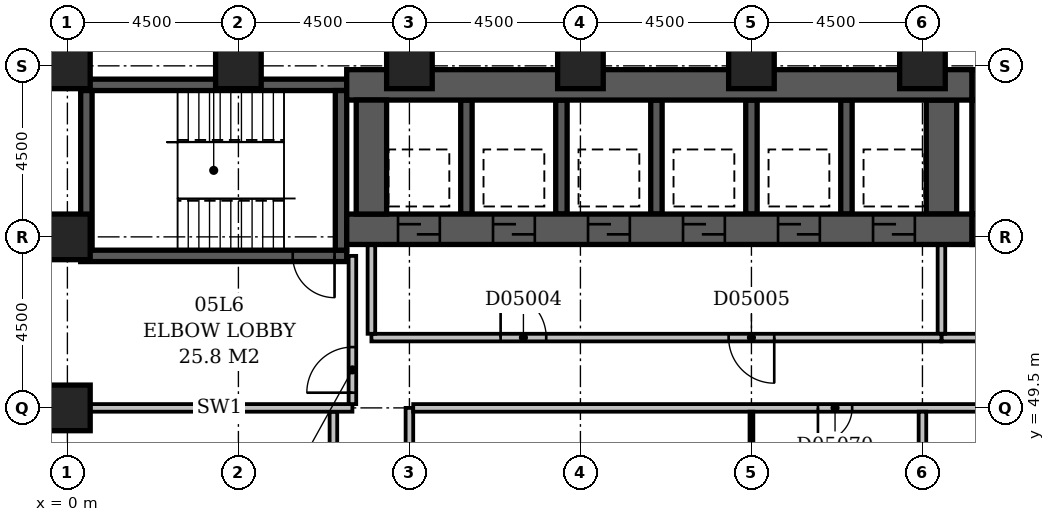
"""IFC4 building model, lengths in metres.
Left out: names, types, materials, properties, quantities, classifications, styles, units other than length and angle.
Written with IfcOpenShell. Run it as: python <this file> out.ifc"""

import sys

from ifc_helpers import new_model, si_unit, direction, frame, frame_2d, origin, origin_2d, place, context, subcontext, project, spatial, rectangle, extrude, element, fill, save


model = new_model("IFC4")
c1 = context("Model", 3, precision=1e-05, world=origin(), true_north=direction((0.0, 1.0)))
c2 = subcontext(c1, "Body", "Model", "MODEL_VIEW")
j1 = project(units=[si_unit("LENGTHUNIT", "METRE"), si_unit("PLANEANGLEUNIT", "RADIAN")], contexts=[c1])
p1 = place(None, origin())
s1 = spatial("IfcSite", under=j1, at=p1, CompositionType="ELEMENT")
p2 = place(p1, origin())
s2 = spatial("IfcBuilding", under=s1, at=p2, CompositionType="ELEMENT")
p3 = place(p2, frame((0.0, 0.0, 29.0)))
s3 = spatial("IfcBuildingStorey", under=s2, at=p3, CompositionType="ELEMENT", Elevation=29.0)
p4 = place(p3, frame((0.35, 53.5, -0.3), z_axis=(0.0, 0.0, 1.0), x_axis=(1.0, 0.0, 0.0)))
e1 = element("IfcWall", 1, at=p4, inside=s3, PredefinedType="SHEAR", context=c2, shape_type="SweptSolid", body=[
    extrude(rectangle(XDim=7.0, YDim=0.3, at=frame_2d((3.5, 0.0))), origin(), (0.0, 0.0, 1.0), 3.6),
])
p5 = place(p4, frame((5.58, 0.0, 0.3)))
e2 = element("IfcOpeningElement", 2, at=p5, cuts=e1, PredefinedType="OPENING", context=c2, shape_type="SweptSolid", body=[
    extrude(rectangle(XDim=1.1, YDim=2.1, at=frame_2d((0.55, 1.05))), frame((0.0, 0.162, 0.0), z_axis=(0.0, -1.0, 0.0), x_axis=(1.0, 0.0, 0.0)), (0.0, 0.0, 1.0), 0.324),
])
p6 = place(p3, frame((0.35, 58.0, -0.3), z_axis=(0.0, 0.0, 1.0), x_axis=(1.0, 0.0, 0.0)))
e3 = element("IfcWall", 3, at=p6, inside=s3, PredefinedType="SHEAR", context=c2, shape_type="SweptSolid", body=[
    extrude(rectangle(XDim=7.0, YDim=0.3, at=frame_2d((3.5, 0.0))), origin(), (0.0, 0.0, 1.0), 3.6),
])
for number, where, z_axis, x_axis in (
    (4, (0.5, 53.65, -0.3), (0.0, 0.0, 1.0), (0.0, 1.0, 0.0)),
    (5, (7.2, 53.65, -0.3), (0.0, 0.0, 1.0), (0.0, 1.0, 0.0)),
):
    element("IfcWall", number, at=place(p3, frame(where, z_axis=z_axis, x_axis=x_axis)), inside=s3, PredefinedType="SHEAR", context=c2, shape_type="SweptSolid", body=[
        extrude(rectangle(XDim=4.2, YDim=0.3, at=frame_2d((2.1, 0.0))), origin(), (0.0, 0.0, 1.0), 3.6),
    ])
p7 = place(p3, frame((7.35, 54.2, -0.3), z_axis=(0.0, 0.0, 1.0), x_axis=(1.0, 0.0, 0.0)))
e6 = element("IfcWall", 6, at=p7, inside=s3, PredefinedType="SHEAR", context=c2, shape_type="SweptSolid", body=[
    extrude(rectangle(XDim=16.45, YDim=0.8, at=frame_2d((8.225, 0.0))), origin(), (0.0, 0.0, 1.0), 3.6),
])
p8 = place(p7, frame((1.35, 0.0, 0.3)))
e7 = element("IfcOpeningElement", 7, at=p8, cuts=e6, PredefinedType="OPENING", context=c2, shape_type="SweptSolid", body=[
    extrude(rectangle(XDim=1.1, YDim=2.1, at=frame_2d((0.55, 1.05))), frame((0.0, 0.412, 0.0), z_axis=(0.0, -1.0, 0.0), x_axis=(1.0, 0.0, 0.0)), (0.0, 0.0, 1.0), 0.824),
])
p9 = place(p7, frame((3.85, 0.0, 0.3)))
e8 = element("IfcOpeningElement", 8, at=p9, cuts=e6, PredefinedType="OPENING", context=c2, shape_type="SweptSolid", body=[
    extrude(rectangle(XDim=1.1, YDim=2.1, at=frame_2d((0.55, 1.05))), frame((0.0, 0.412, 0.0), z_axis=(0.0, -1.0, 0.0), x_axis=(1.0, 0.0, 0.0)), (0.0, 0.0, 1.0), 0.824),
])
p10 = place(p7, frame((6.35, 0.0, 0.3)))
e9 = element("IfcOpeningElement", 9, at=p10, cuts=e6, PredefinedType="OPENING", context=c2, shape_type="SweptSolid", body=[
    extrude(rectangle(XDim=1.1, YDim=2.1, at=frame_2d((0.55, 1.05))), frame((0.0, 0.412, 0.0), z_axis=(0.0, -1.0, 0.0), x_axis=(1.0, 0.0, 0.0)), (0.0, 0.0, 1.0), 0.824),
])
p11 = place(p7, frame((8.85, 0.0, 0.3)))
e10 = element("IfcOpeningElement", 10, at=p11, cuts=e6, PredefinedType="OPENING", context=c2, shape_type="SweptSolid", body=[
    extrude(rectangle(XDim=1.1, YDim=2.1, at=frame_2d((0.55, 1.05))), frame((0.0, 0.412, 0.0), z_axis=(0.0, -1.0, 0.0), x_axis=(1.0, 0.0, 0.0)), (0.0, 0.0, 1.0), 0.824),
])
p12 = place(p7, frame((11.35, 0.0, 0.3)))
e11 = element("IfcOpeningElement", 11, at=p12, cuts=e6, PredefinedType="OPENING", context=c2, shape_type="SweptSolid", body=[
    extrude(rectangle(XDim=1.1, YDim=2.1, at=frame_2d((0.55, 1.05))), frame((0.0, 0.412, 0.0), z_axis=(0.0, -1.0, 0.0), x_axis=(1.0, 0.0, 0.0)), (0.0, 0.0, 1.0), 0.824),
])
p13 = place(p7, frame((13.85, 0.0, 0.3)))
e12 = element("IfcOpeningElement", 12, at=p13, cuts=e6, PredefinedType="OPENING", context=c2, shape_type="SweptSolid", body=[
    extrude(rectangle(XDim=1.1, YDim=2.1, at=frame_2d((0.55, 1.05))), frame((0.0, 0.412, 0.0), z_axis=(0.0, -1.0, 0.0), x_axis=(1.0, 0.0, 0.0)), (0.0, 0.0, 1.0), 0.824),
])
p14 = place(p3, frame((7.35, 58.0, -0.3), z_axis=(0.0, 0.0, 1.0), x_axis=(1.0, 0.0, 0.0)))
e13 = element("IfcWall", 13, at=p14, inside=s3, PredefinedType="SHEAR", context=c2, shape_type="SweptSolid", body=[
    extrude(rectangle(XDim=16.45, YDim=0.8, at=frame_2d((8.225, 0.0))), origin(), (0.0, 0.0, 1.0), 3.6),
])
p15 = place(p3, frame((8.0, 54.6, -0.3), z_axis=(0.0, 0.0, 1.0), x_axis=(0.0, 1.0, 0.0)))
e14 = element("IfcWall", 14, at=p15, inside=s3, PredefinedType="SHEAR", context=c2, shape_type="SweptSolid", body=[
    extrude(rectangle(XDim=3.0, YDim=0.8, at=frame_2d((1.5, 0.0))), origin(), (0.0, 0.0, 1.0), 3.6),
])
for number, where, z_axis, x_axis in (
    (15, (10.5, 54.6, -0.3), (0.0, 0.0, 1.0), (0.0, 1.0, 0.0)),
    (16, (13.0, 54.6, -0.3), (0.0, 0.0, 1.0), (0.0, 1.0, 0.0)),
    (17, (15.5, 54.6, -0.3), (0.0, 0.0, 1.0), (0.0, 1.0, 0.0)),
    (18, (18.0, 54.6, -0.3), (0.0, 0.0, 1.0), (0.0, 1.0, 0.0)),
    (19, (20.5, 54.6, -0.3), (0.0, 0.0, 1.0), (0.0, 1.0, 0.0)),
):
    element("IfcWall", number, at=place(p3, frame(where, z_axis=z_axis, x_axis=x_axis)), inside=s3, PredefinedType="SHEAR", context=c2, shape_type="SweptSolid", body=[
        extrude(rectangle(XDim=3.0, YDim=0.3, at=frame_2d((1.5, 0.0))), origin(), (0.0, 0.0, 1.0), 3.6),
    ])
p16 = place(p3, frame((23.0, 54.6, -0.3), z_axis=(0.0, 0.0, 1.0), x_axis=(0.0, 1.0, 0.0)))
e20 = element("IfcWall", 20, at=p16, inside=s3, PredefinedType="SHEAR", context=c2, shape_type="SweptSolid", body=[
    extrude(rectangle(XDim=3.0, YDim=0.8, at=frame_2d((1.5, 0.0))), origin(), (0.0, 0.0, 1.0), 3.6),
])
p17 = place(p3, frame((23.8, 54.2, -0.3), z_axis=(0.0, 0.0, 1.0), x_axis=(1.0, 0.0, 0.0)))
e21 = element("IfcWall", 21, at=p17, inside=s3, PredefinedType="SHEAR", context=c2, shape_type="SweptSolid", body=[
    extrude(rectangle(XDim=3.3, YDim=0.8, at=frame_2d((1.65, 0.0))), origin(), (0.0, 0.0, 1.0), 3.6),
])
p18 = place(p17, frame((1.1, 0.0, 0.3)))
e22 = element("IfcOpeningElement", 22, at=p18, cuts=e21, PredefinedType="OPENING", context=c2, shape_type="SweptSolid", body=[
    extrude(rectangle(XDim=1.1, YDim=2.1, at=frame_2d((0.55, 1.05))), frame((0.0, 0.412, 0.0), z_axis=(0.0, -1.0, 0.0), x_axis=(1.0, 0.0, 0.0)), (0.0, 0.0, 1.0), 0.824),
])
p19 = place(p3, frame((23.8, 58.0, -0.3), z_axis=(0.0, 0.0, 1.0), x_axis=(1.0, 0.0, 0.0)))
e23 = element("IfcWall", 23, at=p19, inside=s3, PredefinedType="SHEAR", context=c2, shape_type="SweptSolid", body=[
    extrude(rectangle(XDim=3.3, YDim=0.8, at=frame_2d((1.65, 0.0))), origin(), (0.0, 0.0, 1.0), 3.6),
])
p20 = place(p3, frame((24.2, 54.6, -0.3), z_axis=(0.0, 0.0, 1.0), x_axis=(0.0, 1.0, 0.0)))
e24 = element("IfcWall", 24, at=p20, inside=s3, PredefinedType="SHEAR", context=c2, shape_type="SweptSolid", body=[
    extrude(rectangle(XDim=3.0, YDim=0.8, at=frame_2d((1.5, 0.0))), origin(), (0.0, 0.0, 1.0), 3.6),
])
for number, where, z_axis, x_axis in (
    (25, (0.0, 49.5, -0.3), (0.0, 0.0, 1.0), (1.0, 0.0, 0.0)),
    (26, (0.0, 54.0, -0.3), (0.0, 0.0, 1.0), (1.0, 0.0, 0.0)),
    (27, (0.0, 58.5, -0.3), (0.0, 0.0, 1.0), (1.0, 0.0, 0.0)),
    (28, (4.5, 58.5, -0.3), (0.0, 0.0, 1.0), (1.0, 0.0, 0.0)),
    (29, (9.0, 58.5, -0.3), (0.0, 0.0, 1.0), (1.0, 0.0, 0.0)),
    (30, (13.5, 58.5, -0.3), (0.0, 0.0, 1.0), (1.0, 0.0, 0.0)),
    (31, (18.0, 58.5, -0.3), (0.0, 0.0, 1.0), (1.0, 0.0, 0.0)),
    (32, (22.5, 58.5, -0.3), (0.0, 0.0, 1.0), (1.0, 0.0, 0.0)),
):
    element("IfcColumn", number, at=place(p3, frame(where, z_axis=z_axis, x_axis=x_axis)), inside=s3, PredefinedType="COLUMN", context=c2, shape_type="SweptSolid", body=[
        extrude(rectangle(XDim=1.2, YDim=1.2, at=origin_2d()), origin(), (0.0, 0.0, 1.0), 3.6),
    ])
p21 = place(p3, frame((8.0, 51.35, 0.0), z_axis=(0.0, 0.0, 1.0), x_axis=(1.0, 0.0, 0.0)))
e33 = element("IfcWall", 33, at=p21, inside=s3, PredefinedType="PARTITIONING", context=c2, shape_type="SweptSolid", body=[
    extrude(rectangle(XDim=15.0, YDim=0.2, at=frame_2d((7.5, 0.0))), origin(), (0.0, 0.0, 1.0), 3.3),
])
p22 = place(p21, frame((3.4, 0.0, 0.0)))
e34 = element("IfcOpeningElement", 34, at=p22, cuts=e33, PredefinedType="OPENING", context=c2, shape_type="SweptSolid", body=[
    extrude(rectangle(XDim=1.2, YDim=2.1, at=frame_2d((0.6, 1.05))), frame((0.0, 0.112, 0.0), z_axis=(0.0, -1.0, 0.0), x_axis=(1.0, 0.0, 0.0)), (0.0, 0.0, 1.0), 0.224),
])
p23 = place(p21, frame((9.4, 0.0, 0.0)))
e35 = element("IfcOpeningElement", 35, at=p23, cuts=e33, PredefinedType="OPENING", context=c2, shape_type="SweptSolid", body=[
    extrude(rectangle(XDim=1.2, YDim=2.1, at=frame_2d((0.6, 1.05))), frame((0.0, 0.112, 0.0), z_axis=(0.0, -1.0, 0.0), x_axis=(1.0, 0.0, 0.0)), (0.0, 0.0, 1.0), 0.224),
])
for number, where, z_axis, x_axis in (
    (36, (23.0, 51.45, 0.0), (0.0, 0.0, 1.0), (0.0, 1.0, 0.0)),
    (37, (8.0, 51.45, 0.0), (0.0, 0.0, 1.0), (0.0, 1.0, 0.0)),
):
    element("IfcWall", number, at=place(p3, frame(where, z_axis=z_axis, x_axis=x_axis)), inside=s3, PredefinedType="PARTITIONING", context=c2, shape_type="SweptSolid", body=[
        extrude(rectangle(XDim=2.33, YDim=0.2, at=frame_2d((1.165, 0.0))), origin(), (0.0, 0.0, 1.0), 3.3),
    ])
p24 = place(p3, frame((23.0, 51.35, 0.0), z_axis=(0.0, 0.0, 1.0), x_axis=(1.0, 0.0, 0.0)))
e38 = element("IfcWall", 38, at=p24, inside=s3, PredefinedType="PARTITIONING", context=c2, shape_type="SweptSolid", body=[
    extrude(rectangle(XDim=4.8, YDim=0.2, at=frame_2d((2.4, 0.0))), origin(), (0.0, 0.0, 1.0), 3.3),
])
p25 = place(p24, frame((1.65, 0.0, 0.0)))
e39 = element("IfcOpeningElement", 39, at=p25, cuts=e38, PredefinedType="OPENING", context=c2, shape_type="SweptSolid", body=[
    extrude(rectangle(XDim=1.2, YDim=2.1, at=frame_2d((0.6, 1.05))), frame((0.0, 0.112, 0.0), z_axis=(0.0, -1.0, 0.0), x_axis=(1.0, 0.0, 0.0)), (0.0, 0.0, 1.0), 0.224),
])
p26 = place(p3, frame((0.5, 49.5, 0.0), z_axis=(0.0, 0.0, 1.0), x_axis=(1.0, 0.0, 0.0)))
e40 = element("IfcWall", 40, at=p26, inside=s3, PredefinedType="PARTITIONING", context=c2, shape_type="SweptSolid", body=[
    extrude(rectangle(XDim=7.0, YDim=0.2, at=frame_2d((3.5, 0.0))), origin(), (0.0, 0.0, 1.0), 3.3),
])
p27 = place(p3, frame((7.5, 49.6, 0.0), z_axis=(0.0, 0.0, 1.0), x_axis=(0.0, 1.0, 0.0)))
e41 = element("IfcWall", 41, at=p27, inside=s3, PredefinedType="PARTITIONING", context=c2, shape_type="SweptSolid", body=[
    extrude(rectangle(XDim=3.9, YDim=0.2, at=frame_2d((1.95, 0.0))), origin(), (0.0, 0.0, 1.0), 3.3),
])
p28 = place(p27, frame((0.3, 0.0, 0.0)))
e42 = element("IfcOpeningElement", 42, at=p28, cuts=e41, PredefinedType="OPENING", context=c2, shape_type="SweptSolid", body=[
    extrude(rectangle(XDim=1.2, YDim=2.1, at=frame_2d((0.6, 1.05))), frame((0.0, 0.112, 0.0), z_axis=(0.0, -1.0, 0.0), x_axis=(1.0, 0.0, 0.0)), (0.0, 0.0, 1.0), 0.224),
])
p29 = place(p3, frame((9.0, 5.0, 0.0), z_axis=(0.0, 0.0, 1.0), x_axis=(0.0, 1.0, 0.0)))
e43 = element("IfcWall", 43, at=p29, inside=s3, PredefinedType="PARTITIONING", context=c2, shape_type="SweptSolid", body=[
    extrude(rectangle(XDim=44.5, YDim=0.2, at=frame_2d((22.25, 0.0))), origin(), (0.0, 0.0, 1.0), 3.3),
])
p30 = place(p29, frame((24.7, 0.0, 0.0)))
e44 = element("IfcOpeningElement", 44, at=p30, cuts=e43, PredefinedType="OPENING", context=c2, shape_type="SweptSolid", body=[
    extrude(rectangle(XDim=1.0, YDim=2.1, at=frame_2d((0.5, 1.05))), frame((0.0, 0.112, 0.0), z_axis=(0.0, -1.0, 0.0), x_axis=(1.0, 0.0, 0.0)), (0.0, 0.0, 1.0), 0.224),
])
p31 = place(p29, frame((13.3, 0.0, 0.0)))
e45 = element("IfcOpeningElement", 45, at=p31, cuts=e43, PredefinedType="OPENING", context=c2, shape_type="SweptSolid", body=[
    extrude(rectangle(XDim=1.0, YDim=2.1, at=frame_2d((0.5, 1.05))), frame((0.0, 0.112, 0.0), z_axis=(0.0, -1.0, 0.0), x_axis=(1.0, 0.0, 0.0)), (0.0, 0.0, 1.0), 0.224),
])
p32 = place(p29, frame((10.45, 0.0, 0.0)))
e46 = element("IfcOpeningElement", 46, at=p32, cuts=e43, PredefinedType="OPENING", context=c2, shape_type="SweptSolid", body=[
    extrude(rectangle(XDim=1.0, YDim=2.1, at=frame_2d((0.5, 1.05))), frame((0.0, 0.112, 0.0), z_axis=(0.0, -1.0, 0.0), x_axis=(1.0, 0.0, 0.0)), (0.0, 0.0, 1.0), 0.224),
])
p33 = place(p29, frame((5.95, 0.0, 0.0)))
e47 = element("IfcOpeningElement", 47, at=p33, cuts=e43, PredefinedType="OPENING", context=c2, shape_type="SweptSolid", body=[
    extrude(rectangle(XDim=1.0, YDim=2.1, at=frame_2d((0.5, 1.05))), frame((0.0, 0.112, 0.0), z_axis=(0.0, -1.0, 0.0), x_axis=(1.0, 0.0, 0.0)), (0.0, 0.0, 1.0), 0.224),
])
p34 = place(p29, frame((37.25, 0.0, 0.0)))
e48 = element("IfcOpeningElement", 48, at=p34, cuts=e43, PredefinedType="OPENING", context=c2, shape_type="SweptSolid", body=[
    extrude(rectangle(XDim=0.9, YDim=2.1, at=frame_2d((0.45, 1.05))), frame((0.0, 0.112, 0.0), z_axis=(0.0, -1.0, 0.0), x_axis=(1.0, 0.0, 0.0)), (0.0, 0.0, 1.0), 0.224),
])
p35 = place(p29, frame((1.5, 0.0, 0.0)))
e49 = element("IfcOpeningElement", 49, at=p35, cuts=e43, PredefinedType="OPENING", context=c2, shape_type="SweptSolid", body=[
    extrude(rectangle(XDim=0.9, YDim=2.1, at=frame_2d((0.45, 1.05))), frame((0.0, 0.112, 0.0), z_axis=(0.0, -1.0, 0.0), x_axis=(1.0, 0.0, 0.0)), (0.0, 0.0, 1.0), 0.224),
])
p36 = place(p3, frame((7.0, 34.6, 0.0), z_axis=(0.0, 0.0, 1.0), x_axis=(0.0, 1.0, 0.0)))
e50 = element("IfcWall", 50, at=p36, inside=s3, PredefinedType="PARTITIONING", context=c2, shape_type="SweptSolid", body=[
    extrude(rectangle(XDim=14.8, YDim=0.2, at=frame_2d((7.4, 0.0))), origin(), (0.0, 0.0, 1.0), 3.3),
])
p37 = place(p36, frame((6.95, 0.0, 0.0)))
e51 = element("IfcOpeningElement", 51, at=p37, cuts=e50, PredefinedType="OPENING", context=c2, shape_type="SweptSolid", body=[
    extrude(rectangle(XDim=0.9, YDim=2.1, at=frame_2d((0.45, 1.05))), frame((0.0, 0.112, 0.0), z_axis=(0.0, -1.0, 0.0), x_axis=(1.0, 0.0, 0.0)), (0.0, 0.0, 1.0), 0.224),
])
p38 = place(p3, frame((18.0, 36.1, 0.0), z_axis=(0.0, 0.0, 1.0), x_axis=(0.0, 1.0, 0.0)))
e52 = element("IfcWall", 52, at=p38, inside=s3, PredefinedType="PARTITIONING", context=c2, shape_type="SweptSolid", body=[
    extrude(rectangle(XDim=13.3, YDim=0.1, at=frame_2d((6.65, 0.0))), origin(), (0.0, 0.0, 1.0), 3.3),
])
p39 = place(p3, frame((22.5, 36.6, 0.0), z_axis=(0.0, 0.0, 1.0), x_axis=(0.0, 1.0, 0.0)))
e53 = element("IfcWall", 53, at=p39, inside=s3, PredefinedType="PARTITIONING", context=c2, shape_type="SweptSolid", body=[
    extrude(rectangle(XDim=12.8, YDim=0.2, at=frame_2d((6.4, 0.0))), origin(), (0.0, 0.0, 1.0), 3.3),
])
p40 = place(p3, frame((9.1, 49.5, 0.0), z_axis=(0.0, 0.0, 1.0), x_axis=(1.0, 0.0, 0.0)))
e54 = element("IfcWall", 54, at=p40, inside=s3, PredefinedType="PARTITIONING", context=c2, shape_type="SweptSolid", body=[
    extrude(rectangle(XDim=57.8, YDim=0.2, at=frame_2d((28.9, 0.0))), origin(), (0.0, 0.0, 1.0), 3.3),
])
p41 = place(p40, frame((20.6, 0.0, 0.0)))
e55 = element("IfcOpeningElement", 55, at=p41, cuts=e54, PredefinedType="OPENING", context=c2, shape_type="SweptSolid", body=[
    extrude(rectangle(XDim=1.0, YDim=2.1, at=frame_2d((0.5, 1.05))), frame((0.0, 0.112, 0.0), z_axis=(0.0, -1.0, 0.0), x_axis=(1.0, 0.0, 0.0)), (0.0, 0.0, 1.0), 0.224),
])
p42 = place(p40, frame((31.7, 0.0, 0.0)))
e56 = element("IfcOpeningElement", 56, at=p42, cuts=e54, PredefinedType="OPENING", context=c2, shape_type="SweptSolid", body=[
    extrude(rectangle(XDim=1.0, YDim=2.1, at=frame_2d((0.5, 1.05))), frame((0.0, 0.112, 0.0), z_axis=(0.0, -1.0, 0.0), x_axis=(1.0, 0.0, 0.0)), (0.0, 0.0, 1.0), 0.224),
])
p43 = place(p40, frame((47.6, 0.0, 0.0)))
e57 = element("IfcOpeningElement", 57, at=p43, cuts=e54, PredefinedType="OPENING", context=c2, shape_type="SweptSolid", body=[
    extrude(rectangle(XDim=1.0, YDim=2.1, at=frame_2d((0.5, 1.05))), frame((0.0, 0.112, 0.0), z_axis=(0.0, -1.0, 0.0), x_axis=(1.0, 0.0, 0.0)), (0.0, 0.0, 1.0), 0.224),
])
p44 = place(p40, frame((54.15, 0.0, 0.0)))
e58 = element("IfcOpeningElement", 58, at=p44, cuts=e54, PredefinedType="OPENING", context=c2, shape_type="SweptSolid", body=[
    extrude(rectangle(XDim=1.0, YDim=2.1, at=frame_2d((0.5, 1.05))), frame((0.0, 0.112, 0.0), z_axis=(0.0, -1.0, 0.0), x_axis=(1.0, 0.0, 0.0)), (0.0, 0.0, 1.0), 0.224),
])
p45 = place(p40, frame((10.65, 0.0, 0.0)))
e59 = element("IfcOpeningElement", 59, at=p45, cuts=e54, PredefinedType="OPENING", context=c2, shape_type="SweptSolid", body=[
    extrude(rectangle(XDim=0.9, YDim=2.1, at=frame_2d((0.45, 1.05))), frame((0.0, 0.112, 0.0), z_axis=(0.0, -1.0, 0.0), x_axis=(1.0, 0.0, 0.0)), (0.0, 0.0, 1.0), 0.224),
])
p46 = place(p28, origin())
e60 = element("IfcDoor", 60, at=p46, inside=s3, OperationType="SINGLE_SWING_LEFT", PredefinedType="DOOR", context=c2, shape_type="SweptSolid", body=[
    extrude(rectangle(XDim=1.2, YDim=2.1, at=frame_2d((0.6, 1.05))), frame((0.0, 0.025, 0.0), z_axis=(0.0, -1.0, 0.0), x_axis=(1.0, 0.0, 0.0)), (0.0, 0.0, 1.0), 0.05),
])
fill(e42, e60)
p47 = place(p8, origin())
e61 = element("IfcDoor", 61, at=p47, inside=s3, OperationType="SLIDING_TO_LEFT", PredefinedType="DOOR", context=c2, shape_type="SweptSolid", body=[
    extrude(rectangle(XDim=1.1, YDim=2.1, at=frame_2d((0.55, 1.05))), frame((0.0, 0.025, 0.0), z_axis=(0.0, -1.0, 0.0), x_axis=(1.0, 0.0, 0.0)), (0.0, 0.0, 1.0), 0.05),
])
fill(e7, e61)
p48 = place(p9, origin())
e62 = element("IfcDoor", 62, at=p48, inside=s3, OperationType="SLIDING_TO_LEFT", PredefinedType="DOOR", context=c2, shape_type="SweptSolid", body=[
    extrude(rectangle(XDim=1.1, YDim=2.1, at=frame_2d((0.55, 1.05))), frame((0.0, 0.025, 0.0), z_axis=(0.0, -1.0, 0.0), x_axis=(1.0, 0.0, 0.0)), (0.0, 0.0, 1.0), 0.05),
])
fill(e8, e62)
p49 = place(p10, origin())
e63 = element("IfcDoor", 63, at=p49, inside=s3, OperationType="SLIDING_TO_LEFT", PredefinedType="DOOR", context=c2, shape_type="SweptSolid", body=[
    extrude(rectangle(XDim=1.1, YDim=2.1, at=frame_2d((0.55, 1.05))), frame((0.0, 0.025, 0.0), z_axis=(0.0, -1.0, 0.0), x_axis=(1.0, 0.0, 0.0)), (0.0, 0.0, 1.0), 0.05),
])
fill(e9, e63)
p50 = place(p11, origin())
e64 = element("IfcDoor", 64, at=p50, inside=s3, OperationType="SLIDING_TO_LEFT", PredefinedType="DOOR", context=c2, shape_type="SweptSolid", body=[
    extrude(rectangle(XDim=1.1, YDim=2.1, at=frame_2d((0.55, 1.05))), frame((0.0, 0.025, 0.0), z_axis=(0.0, -1.0, 0.0), x_axis=(1.0, 0.0, 0.0)), (0.0, 0.0, 1.0), 0.05),
])
fill(e10, e64)
p51 = place(p12, origin())
e65 = element("IfcDoor", 65, at=p51, inside=s3, OperationType="SLIDING_TO_LEFT", PredefinedType="DOOR", context=c2, shape_type="SweptSolid", body=[
    extrude(rectangle(XDim=1.1, YDim=2.1, at=frame_2d((0.55, 1.05))), frame((0.0, 0.025, 0.0), z_axis=(0.0, -1.0, 0.0), x_axis=(1.0, 0.0, 0.0)), (0.0, 0.0, 1.0), 0.05),
])
fill(e11, e65)
p52 = place(p13, origin())
e66 = element("IfcDoor", 66, at=p52, inside=s3, OperationType="SLIDING_TO_LEFT", PredefinedType="DOOR", context=c2, shape_type="SweptSolid", body=[
    extrude(rectangle(XDim=1.1, YDim=2.1, at=frame_2d((0.55, 1.05))), frame((0.0, 0.025, 0.0), z_axis=(0.0, -1.0, 0.0), x_axis=(1.0, 0.0, 0.0)), (0.0, 0.0, 1.0), 0.05),
])
fill(e12, e66)
p53 = place(p22, origin())
e67 = element("IfcDoor", 67, at=p53, inside=s3, OperationType="SINGLE_SWING_LEFT", PredefinedType="DOOR", context=c2, shape_type="SweptSolid", body=[
    extrude(rectangle(XDim=1.2, YDim=2.1, at=frame_2d((0.6, 1.05))), frame((0.0, 0.025, 0.0), z_axis=(0.0, -1.0, 0.0), x_axis=(1.0, 0.0, 0.0)), (0.0, 0.0, 1.0), 0.05),
])
fill(e34, e67)
p54 = place(p23, origin())
e68 = element("IfcDoor", 68, at=p54, inside=s3, OperationType="SINGLE_SWING_RIGHT", PredefinedType="DOOR", context=c2, shape_type="SweptSolid", body=[
    extrude(rectangle(XDim=1.2, YDim=2.1, at=frame_2d((0.6, 1.05))), frame((0.0, 0.025, 0.0), z_axis=(0.0, -1.0, 0.0), x_axis=(1.0, 0.0, 0.0)), (0.0, 0.0, 1.0), 0.05),
])
fill(e35, e68)
p55 = place(p5, origin())
e69 = element("IfcDoor", 69, at=p55, inside=s3, OperationType="SINGLE_SWING_RIGHT", PredefinedType="DOOR", context=c2, shape_type="SweptSolid", body=[
    extrude(rectangle(XDim=1.1, YDim=2.1, at=frame_2d((0.55, 1.05))), frame((0.0, 0.025, 0.0), z_axis=(0.0, -1.0, 0.0), x_axis=(1.0, 0.0, 0.0)), (0.0, 0.0, 1.0), 0.05),
])
fill(e2, e69)
p56 = place(p45, frame((0.9, 0.0, 0.0), z_axis=(0.0, 0.0, 1.0), x_axis=(-1.0, 0.0, 0.0)))
e70 = element("IfcDoor", 70, at=p56, inside=s3, OperationType="SINGLE_SWING_RIGHT", PredefinedType="DOOR", context=c2, shape_type="SweptSolid", body=[
    extrude(rectangle(XDim=0.9, YDim=2.1, at=frame_2d((0.45, 1.05))), frame((0.0, 0.025, 0.0), z_axis=(0.0, -1.0, 0.0), x_axis=(1.0, 0.0, 0.0)), (0.0, 0.0, 1.0), 0.05),
])
fill(e59, e70)
save(model, sys.argv[1])
